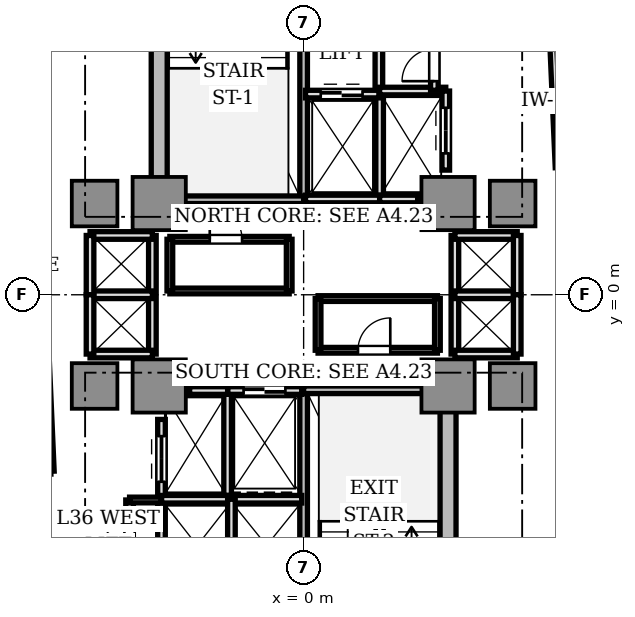
"""IFC4 building model, lengths in metres.
Left out: names, types, materials, properties, quantities, classifications, styles, units other than length and angle.
Written with IfcOpenShell. Run it as: python <this file> out.ifc"""

import sys

from ifc_helpers import new_model, si_unit, direction, frame, frame_2d, origin, origin_2d, place, context, subcontext, project, spatial, rectangle, extrude, source, transform, mapped, element, fill, save


model = new_model("IFC4")
c1 = context("Model", 3, precision=1e-05, world=origin(), true_north=direction((0.0, 1.0)))
c2 = subcontext(c1, "Body", "Model", "MODEL_VIEW")
j1 = project(units=[si_unit("LENGTHUNIT", "METRE"), si_unit("PLANEANGLEUNIT", "RADIAN")], contexts=[c1])
p1 = place(None, origin())
s1 = spatial("IfcSite", under=j1, at=p1, CompositionType="ELEMENT")
p2 = place(p1, origin())
s2 = spatial("IfcBuilding", under=s1, at=p2, CompositionType="ELEMENT")
p3 = place(p2, frame((0.0, 0.0, 131.55)))
s3 = spatial("IfcBuildingStorey", under=s2, at=p3, CompositionType="ELEMENT", Elevation=131.55)
for number, where, z_axis, x_axis in (
    (1, (-3.8, 2.85, 0.0), (0.0, 0.0, 1.0), (0.0, 1.0, 0.0)),
    (2, (3.8, -9.75, 0.0), (0.0, 0.0, 1.0), (0.0, 1.0, 0.0)),
):
    element("IfcWall", number, at=place(p3, frame(where, z_axis=z_axis, x_axis=x_axis)), inside=s3, PredefinedType="SHEAR", context=c2, shape_type="SweptSolid", body=[
        extrude(rectangle(XDim=6.9, YDim=0.42, at=frame_2d((3.45, 0.0))), origin(), (0.0, 0.0, 1.0), 3.11),
    ])
m1 = source(origin(), c2, "Body", "SweptSolid", [
    extrude(rectangle(XDim=1.4, YDim=1.4, at=origin_2d()), origin(), (0.0, 0.0, 1.0), 3.11),
])
for number, where, z_axis, x_axis in (
    (3, (-3.8, 2.4, 0.0), (0.0, 0.0, 1.0), (1.0, 0.0, 0.0)),
    (4, (3.8, 2.4, 0.0), (0.0, 0.0, 1.0), (1.0, 0.0, 0.0)),
    (5, (-3.8, -2.4, 0.0), (0.0, 0.0, 1.0), (1.0, 0.0, 0.0)),
    (6, (3.8, -2.4, 0.0), (0.0, 0.0, 1.0), (1.0, 0.0, 0.0)),
):
    element("IfcColumn", number, at=place(p3, frame(where, z_axis=z_axis, x_axis=x_axis)), inside=s3, PredefinedType="COLUMN", context=c2, shape_type="MappedRepresentation", body=[
        mapped(m1, transform((0.0, 0.0, 0.0), scale=1.0)),
    ])
m2 = source(origin(), c2, "Body", "SweptSolid", [
    extrude(rectangle(XDim=1.2, YDim=1.2, at=origin_2d()), origin(), (0.0, 0.0, 1.0), 3.11),
])
for number, where, z_axis, x_axis in (
    (7, (5.5, 2.4, 0.0), (0.0, 0.0, 1.0), (1.0, 0.0, 0.0)),
    (8, (-5.5, 2.4, 0.0), (0.0, 0.0, 1.0), (1.0, 0.0, 0.0)),
    (9, (5.5, -2.4, 0.0), (0.0, 0.0, 1.0), (1.0, 0.0, 0.0)),
    (10, (-5.5, -2.4, 0.0), (0.0, 0.0, 1.0), (1.0, 0.0, 0.0)),
):
    element("IfcColumn", number, at=place(p3, frame(where, z_axis=z_axis, x_axis=x_axis)), inside=s3, PredefinedType="COLUMN", context=c2, shape_type="MappedRepresentation", body=[
        mapped(m2, transform((0.0, 0.0, 0.0), scale=1.0)),
    ])
p4 = place(p3, frame((0.0, 2.5, 0.0), z_axis=(0.0, 0.0, 1.0), x_axis=(0.0, 1.0, 0.0)))
e11 = element("IfcWall", 11, at=p4, inside=s3, PredefinedType="SOLIDWALL", context=c2, shape_type="SweptSolid", body=[
    extrude(rectangle(XDim=7.68, YDim=0.2, at=frame_2d((3.84, 0.0))), origin(), (0.0, 0.0, 1.0), 3.11),
])
p5 = place(p4, frame((6.36, 0.0, 0.0)))
e12 = element("IfcOpeningElement", 12, at=p5, cuts=e11, PredefinedType="OPENING", context=c2, shape_type="SweptSolid", body=[
    extrude(rectangle(XDim=1.1, YDim=2.15, at=frame_2d((0.55, 1.075))), frame((0.0, 0.11, 0.0), z_axis=(0.0, -1.0, 0.0), x_axis=(1.0, 0.0, 0.0)), (0.0, 0.0, 1.0), 0.22),
])
p6 = place(p3, frame((-3.72, 2.5, 0.0), z_axis=(0.0, 0.0, 1.0), x_axis=(1.0, 0.0, 0.0)))
e13 = element("IfcWall", 13, at=p6, inside=s3, PredefinedType="SOLIDWALL", context=c2, shape_type="SweptSolid", body=[
    extrude(rectangle(XDim=3.72, YDim=0.2, at=frame_2d((1.86, 0.0))), origin(), (0.0, 0.0, 1.0), 3.11),
])
p7 = place(p3, frame((0.0, -10.18, 0.0), z_axis=(0.0, 0.0, 1.0), x_axis=(0.0, 1.0, 0.0)))
e14 = element("IfcWall", 14, at=p7, inside=s3, PredefinedType="SOLIDWALL", context=c2, shape_type="SweptSolid", body=[
    extrude(rectangle(XDim=7.68, YDim=0.2, at=frame_2d((3.84, 0.0))), origin(), (0.0, 0.0, 1.0), 3.11),
])
p8 = place(p7, frame((0.28, 0.0, 0.0)))
e15 = element("IfcOpeningElement", 15, at=p8, cuts=e14, PredefinedType="OPENING", context=c2, shape_type="SweptSolid", body=[
    extrude(rectangle(XDim=1.1, YDim=2.15, at=frame_2d((0.55, 1.075))), frame((0.0, 0.11, 0.0), z_axis=(0.0, -1.0, 0.0), x_axis=(1.0, 0.0, 0.0)), (0.0, 0.0, 1.0), 0.22),
])
p9 = place(p3, frame((0.0, -2.5, 0.0), z_axis=(0.0, 0.0, 1.0), x_axis=(1.0, 0.0, 0.0)))
e16 = element("IfcWall", 16, at=p9, inside=s3, PredefinedType="SOLIDWALL", context=c2, shape_type="SweptSolid", body=[
    extrude(rectangle(XDim=3.72, YDim=0.2, at=frame_2d((1.86, 0.0))), origin(), (0.0, 0.0, 1.0), 3.11),
])
p10 = place(p3, frame((1.98, 5.32, 0.0), z_axis=(0.0, 0.0, 1.0), x_axis=(0.0, 1.0, 0.0)))
e17 = element("IfcWall", 17, at=p10, inside=s3, PredefinedType="SOLIDWALL", context=c2, shape_type="SweptSolid", body=[
    extrude(rectangle(XDim=4.66, YDim=0.2, at=frame_2d((2.33, 0.0))), origin(), (0.0, 0.0, 1.0), 2.66),
])
p11 = place(p10, frame((3.04, 0.0, 0.0)))
e18 = element("IfcOpeningElement", 18, at=p11, cuts=e17, PredefinedType="OPENING", context=c2, shape_type="SweptSolid", body=[
    extrude(rectangle(XDim=0.85, YDim=2.1, at=frame_2d((0.425, 1.05))), frame((0.0, 0.11, 0.0), z_axis=(0.0, -1.0, 0.0), x_axis=(1.0, 0.0, 0.0)), (0.0, 0.0, 1.0), 0.22),
])
p12 = place(p3, frame((2.0, 2.5, 0.0), z_axis=(0.0, 0.0, 1.0), x_axis=(0.0, 1.0, 0.0)))
e19 = element("IfcWall", 19, at=p12, inside=s3, PredefinedType="SOLIDWALL", context=c2, shape_type="SweptSolid", body=[
    extrude(rectangle(XDim=2.78, YDim=0.2, at=frame_2d((1.39, 0.0))), origin(), (0.0, 0.0, 1.0), 2.66),
])
p13 = place(p3, frame((0.05, 2.52, 0.0), z_axis=(0.0, 0.0, 1.0), x_axis=(1.0, 0.0, 0.0)))
e20 = element("IfcWall", 20, at=p13, inside=s3, PredefinedType="SOLIDWALL", context=c2, shape_type="SweptSolid", body=[
    extrude(rectangle(XDim=1.95, YDim=0.2, at=frame_2d((0.975, 0.0))), origin(), (0.0, 0.0, 1.0), 2.66),
])
p14 = place(p3, frame((0.05, 5.28, 0.0), z_axis=(0.0, 0.0, 1.0), x_axis=(1.0, 0.0, 0.0)))
e21 = element("IfcWall", 21, at=p14, inside=s3, PredefinedType="SOLIDWALL", context=c2, shape_type="SweptSolid", body=[
    extrude(rectangle(XDim=1.93, YDim=0.2, at=frame_2d((0.965, 0.0))), origin(), (0.0, 0.0, 1.0), 2.66),
])
p15 = place(p14, frame((0.4, 0.0, 0.0)))
e22 = element("IfcOpeningElement", 22, at=p15, cuts=e21, PredefinedType="OPENING", context=c2, shape_type="SweptSolid", body=[
    extrude(rectangle(XDim=1.1, YDim=2.2, at=frame_2d((0.55, 1.1))), frame((0.0, 0.11, 0.0), z_axis=(0.0, -1.0, 0.0), x_axis=(1.0, 0.0, 0.0)), (0.0, 0.0, 1.0), 0.22),
])
p16 = place(p3, frame((-2.0, -5.28, 0.0), z_axis=(0.0, 0.0, 1.0), x_axis=(0.0, 1.0, 0.0)))
e23 = element("IfcWall", 23, at=p16, inside=s3, PredefinedType="SOLIDWALL", context=c2, shape_type="SweptSolid", body=[
    extrude(rectangle(XDim=2.78, YDim=0.2, at=frame_2d((1.39, 0.0))), origin(), (0.0, 0.0, 1.0), 2.66),
])
p17 = place(p3, frame((-2.0, -2.52, 0.0), z_axis=(0.0, 0.0, 1.0), x_axis=(1.0, 0.0, 0.0)))
e24 = element("IfcWall", 24, at=p17, inside=s3, PredefinedType="SOLIDWALL", context=c2, shape_type="SweptSolid", body=[
    extrude(rectangle(XDim=1.95, YDim=0.2, at=frame_2d((0.975, 0.0))), origin(), (0.0, 0.0, 1.0), 2.66),
])
p18 = place(p17, frame((0.42, 0.0, 0.0)))
e25 = element("IfcOpeningElement", 25, at=p18, cuts=e24, PredefinedType="OPENING", context=c2, shape_type="SweptSolid", body=[
    extrude(rectangle(XDim=1.1, YDim=2.2, at=frame_2d((0.55, 1.1))), frame((0.0, 0.11, 0.0), z_axis=(0.0, -1.0, 0.0), x_axis=(1.0, 0.0, 0.0)), (0.0, 0.0, 1.0), 0.22),
])
p19 = place(p3, frame((2.0, 2.52, 0.0), z_axis=(0.0, 0.0, 1.0), x_axis=(1.0, 0.0, 0.0)))
e26 = element("IfcWall", 26, at=p19, inside=s3, PredefinedType="SOLIDWALL", context=c2, shape_type="SweptSolid", body=[
    extrude(rectangle(XDim=1.0, YDim=0.2, at=frame_2d((0.5, 0.0))), origin(), (0.0, 0.0, 1.0), 2.66),
])
p20 = place(p3, frame((2.0, 5.36, 0.0), z_axis=(0.0, 0.0, 1.0), x_axis=(1.0, 0.0, 0.0)))
e27 = element("IfcWall", 27, at=p20, inside=s3, PredefinedType="SOLIDWALL", context=c2, shape_type="SweptSolid", body=[
    extrude(rectangle(XDim=1.74, YDim=0.2, at=frame_2d((0.87, 0.0))), origin(), (0.0, 0.0, 1.0), 2.66),
])
p21 = place(p3, frame((3.74, 3.28, 0.0), z_axis=(0.0, 0.0, 1.0), x_axis=(0.0, 1.0, 0.0)))
e28 = element("IfcWall", 28, at=p21, inside=s3, PredefinedType="SOLIDWALL", context=c2, shape_type="SweptSolid", body=[
    extrude(rectangle(XDim=2.08, YDim=0.2, at=frame_2d((1.04, 0.0))), origin(), (0.0, 0.0, 1.0), 2.66),
])
p22 = place(p21, frame((0.44, 0.0, 0.0)))
e29 = element("IfcOpeningElement", 29, at=p22, cuts=e28, PredefinedType="OPENING", context=c2, shape_type="SweptSolid", body=[
    extrude(rectangle(XDim=1.2, YDim=2.2, at=frame_2d((0.6, 1.1))), frame((0.0, 0.11, 0.0), z_axis=(0.0, -1.0, 0.0), x_axis=(1.0, 0.0, 0.0)), (0.0, 0.0, 1.0), 0.22),
])
p23 = place(p3, frame((-3.0, -2.52, 0.0), z_axis=(0.0, 0.0, 1.0), x_axis=(1.0, 0.0, 0.0)))
e30 = element("IfcWall", 30, at=p23, inside=s3, PredefinedType="SOLIDWALL", context=c2, shape_type="SweptSolid", body=[
    extrude(rectangle(XDim=1.0, YDim=0.2, at=frame_2d((0.5, 0.0))), origin(), (0.0, 0.0, 1.0), 2.66),
])
p24 = place(p3, frame((-3.74, -5.36, 0.0), z_axis=(0.0, 0.0, 1.0), x_axis=(0.0, 1.0, 0.0)))
e31 = element("IfcWall", 31, at=p24, inside=s3, PredefinedType="SOLIDWALL", context=c2, shape_type="SweptSolid", body=[
    extrude(rectangle(XDim=2.08, YDim=0.2, at=frame_2d((1.04, 0.0))), origin(), (0.0, 0.0, 1.0), 2.66),
])
p25 = place(p24, frame((0.44, 0.0, 0.0)))
e32 = element("IfcOpeningElement", 32, at=p25, cuts=e31, PredefinedType="OPENING", context=c2, shape_type="SweptSolid", body=[
    extrude(rectangle(XDim=1.2, YDim=2.2, at=frame_2d((0.6, 1.1))), frame((0.0, 0.11, 0.0), z_axis=(0.0, -1.0, 0.0), x_axis=(1.0, 0.0, 0.0)), (0.0, 0.0, 1.0), 0.22),
])
p26 = place(p3, frame((-3.74, -7.86, 0.0), z_axis=(0.0, 0.0, 1.0), x_axis=(0.0, 1.0, 0.0)))
e33 = element("IfcWall", 33, at=p26, inside=s3, PredefinedType="SOLIDWALL", context=c2, shape_type="SweptSolid", body=[
    extrude(rectangle(XDim=2.48, YDim=0.2, at=frame_2d((1.24, 0.0))), origin(), (0.0, 0.0, 1.0), 2.66),
])
p27 = place(p3, frame((-3.74, -5.38, 0.0), z_axis=(0.0, 0.0, 1.0), x_axis=(1.0, 0.0, 0.0)))
e34 = element("IfcWall", 34, at=p27, inside=s3, PredefinedType="SOLIDWALL", context=c2, shape_type="SweptSolid", body=[
    extrude(rectangle(XDim=3.69, YDim=0.2, at=frame_2d((1.845, 0.0))), origin(), (0.0, 0.0, 1.0), 2.66),
])
p28 = place(p3, frame((-1.9, -7.86, 0.0), z_axis=(0.0, 0.0, 1.0), x_axis=(0.0, 1.0, 0.0)))
e35 = element("IfcWall", 35, at=p28, inside=s3, PredefinedType="SOLIDWALL", context=c2, shape_type="SweptSolid", body=[
    extrude(rectangle(XDim=2.48, YDim=0.2, at=frame_2d((1.24, 0.0))), origin(), (0.0, 0.0, 1.0), 2.66),
])
p29 = place(p3, frame((3.98, -1.56, 0.0), z_axis=(0.0, 0.0, 1.0), x_axis=(0.0, 1.0, 0.0)))
e36 = element("IfcWall", 36, at=p29, inside=s3, PredefinedType="SOLIDWALL", context=c2, shape_type="SweptSolid", body=[
    extrude(rectangle(XDim=3.12, YDim=0.2, at=frame_2d((1.56, 0.0))), origin(), (0.0, 0.0, 1.0), 2.28),
])
for number, where, z_axis, x_axis in (
    (37, (3.98, 1.56, 0.0), (0.0, 0.0, 1.0), (1.0, 0.0, 0.0)),
    (38, (3.98, -1.56, 0.0), (0.0, 0.0, 1.0), (1.0, 0.0, 0.0)),
    (39, (3.98, 0.0, 0.0), (0.0, 0.0, 1.0), (1.0, 0.0, 0.0)),
):
    element("IfcWall", number, at=place(p3, frame(where, z_axis=z_axis, x_axis=x_axis)), inside=s3, PredefinedType="SOLIDWALL", context=c2, shape_type="SweptSolid", body=[
        extrude(rectangle(XDim=1.64, YDim=0.2, at=frame_2d((0.82, 0.0))), origin(), (0.0, 0.0, 1.0), 2.66),
    ])
for number, where, z_axis, x_axis in (
    (40, (5.62, 0.0, 0.0), (0.0, 0.0, 1.0), (0.0, 1.0, 0.0)),
    (41, (5.62, -1.56, 0.0), (0.0, 0.0, 1.0), (0.0, 1.0, 0.0)),
):
    element("IfcWall", number, at=place(p3, frame(where, z_axis=z_axis, x_axis=x_axis)), inside=s3, PredefinedType="SOLIDWALL", context=c2, shape_type="SweptSolid", body=[
        extrude(rectangle(XDim=1.56, YDim=0.2, at=frame_2d((0.78, 0.0))), origin(), (0.0, 0.0, 1.0), 2.66),
    ])
p30 = place(p3, frame((-3.98, -1.56, 0.0), z_axis=(0.0, 0.0, 1.0), x_axis=(0.0, 1.0, 0.0)))
e42 = element("IfcWall", 42, at=p30, inside=s3, PredefinedType="SOLIDWALL", context=c2, shape_type="SweptSolid", body=[
    extrude(rectangle(XDim=3.12, YDim=0.2, at=frame_2d((1.56, 0.0))), origin(), (0.0, 0.0, 1.0), 2.28),
])
for number, where, z_axis, x_axis in (
    (43, (-5.62, 1.56, 0.0), (0.0, 0.0, 1.0), (1.0, 0.0, 0.0)),
    (44, (-5.62, -1.56, 0.0), (0.0, 0.0, 1.0), (1.0, 0.0, 0.0)),
    (45, (-5.62, 0.0, 0.0), (0.0, 0.0, 1.0), (1.0, 0.0, 0.0)),
):
    element("IfcWall", number, at=place(p3, frame(where, z_axis=z_axis, x_axis=x_axis)), inside=s3, PredefinedType="SOLIDWALL", context=c2, shape_type="SweptSolid", body=[
        extrude(rectangle(XDim=1.64, YDim=0.2, at=frame_2d((0.82, 0.0))), origin(), (0.0, 0.0, 1.0), 2.66),
    ])
for number, where, z_axis, x_axis in (
    (46, (-5.62, 0.0, 0.0), (0.0, 0.0, 1.0), (0.0, 1.0, 0.0)),
    (47, (-5.62, -1.56, 0.0), (0.0, 0.0, 1.0), (0.0, 1.0, 0.0)),
):
    element("IfcWall", number, at=place(p3, frame(where, z_axis=z_axis, x_axis=x_axis)), inside=s3, PredefinedType="SOLIDWALL", context=c2, shape_type="SweptSolid", body=[
        extrude(rectangle(XDim=1.56, YDim=0.2, at=frame_2d((0.78, 0.0))), origin(), (0.0, 0.0, 1.0), 2.66),
    ])
p31 = place(p3, frame((3.44, 5.38, 0.0), z_axis=(0.0, 0.0, 1.0), x_axis=(0.0, 1.0, 0.0)))
e48 = element("IfcWall", 48, at=p31, inside=s3, PredefinedType="SOLIDWALL", context=c2, shape_type="SweptSolid", body=[
    extrude(rectangle(XDim=2.77, YDim=0.2, at=frame_2d((1.385, 0.0))), origin(), (0.0, 0.0, 1.0), 2.66),
])
p32 = place(p31, frame((0.24, 0.0, 0.0)))
e49 = element("IfcOpeningElement", 49, at=p32, cuts=e48, PredefinedType="OPENING", context=c2, shape_type="SweptSolid", body=[
    extrude(rectangle(XDim=0.85, YDim=2.1, at=frame_2d((0.425, 1.05))), frame((0.0, 0.11, 0.0), z_axis=(0.0, -1.0, 0.0), x_axis=(1.0, 0.0, 0.0)), (0.0, 0.0, 1.0), 0.22),
])
p33 = place(p31, frame((1.62, 0.0, 0.0)))
e50 = element("IfcOpeningElement", 50, at=p33, cuts=e48, PredefinedType="OPENING", context=c2, shape_type="SweptSolid", body=[
    extrude(rectangle(XDim=0.85, YDim=2.1, at=frame_2d((0.425, 1.05))), frame((0.0, 0.11, 0.0), z_axis=(0.0, -1.0, 0.0), x_axis=(1.0, 0.0, 0.0)), (0.0, 0.0, 1.0), 0.22),
])
p34 = place(p3, frame((-4.58, -7.86, 0.0), z_axis=(0.0, 0.0, 1.0), x_axis=(0.0, 1.0, 0.0)))
e51 = element("IfcWall", 51, at=p34, inside=s3, PredefinedType="SOLIDWALL", context=c2, shape_type="SweptSolid", body=[
    extrude(rectangle(XDim=2.46, YDim=0.2, at=frame_2d((1.23, 0.0))), origin(), (0.0, 0.0, 1.0), 2.66),
])
p35 = place(p34, frame((0.2, 0.0, 0.0)))
e52 = element("IfcOpeningElement", 52, at=p35, cuts=e51, PredefinedType="OPENING", context=c2, shape_type="SweptSolid", body=[
    extrude(rectangle(XDim=0.85, YDim=2.1, at=frame_2d((0.425, 1.05))), frame((0.0, 0.11, 0.0), z_axis=(0.0, -1.0, 0.0), x_axis=(1.0, 0.0, 0.0)), (0.0, 0.0, 1.0), 0.22),
])
p36 = place(p34, frame((1.38, 0.0, 0.0)))
e53 = element("IfcOpeningElement", 53, at=p36, cuts=e51, PredefinedType="OPENING", context=c2, shape_type="SweptSolid", body=[
    extrude(rectangle(XDim=0.85, YDim=2.1, at=frame_2d((0.425, 1.05))), frame((0.0, 0.11, 0.0), z_axis=(0.0, -1.0, 0.0), x_axis=(1.0, 0.0, 0.0)), (0.0, 0.0, 1.0), 0.22),
])
p37 = place(p3, frame((-4.58, -5.4, 0.0), z_axis=(0.0, 0.0, 1.0), x_axis=(1.0, 0.0, 0.0)))
e54 = element("IfcWall", 54, at=p37, inside=s3, PredefinedType="PARTITIONING", context=c2, shape_type="SweptSolid", body=[
    extrude(rectangle(XDim=0.84, YDim=0.15, at=frame_2d((0.42, 0.0))), origin(), (0.0, 0.0, 1.0), 2.66),
])
p38 = place(p3, frame((-3.52, 0.1, 0.0), z_axis=(0.0, 0.0, 1.0), x_axis=(1.0, 0.0, 0.0)))
e55 = element("IfcWall", 55, at=p38, inside=s3, PredefinedType="PARTITIONING", context=c2, shape_type="SweptSolid", body=[
    extrude(rectangle(XDim=3.14, YDim=0.15, at=frame_2d((1.57, 0.0))), origin(), (0.0, 0.0, 1.0), 2.66),
])
p39 = place(p3, frame((-3.52, 1.46, 0.0), z_axis=(0.0, 0.0, 1.0), x_axis=(1.0, 0.0, 0.0)))
e56 = element("IfcWall", 56, at=p39, inside=s3, PredefinedType="PARTITIONING", context=c2, shape_type="SweptSolid", body=[
    extrude(rectangle(XDim=3.14, YDim=0.15, at=frame_2d((1.57, 0.0))), origin(), (0.0, 0.0, 1.0), 2.66),
])
p40 = place(p39, frame((1.05, 0.0, 0.0)))
e57 = element("IfcOpeningElement", 57, at=p40, cuts=e56, PredefinedType="OPENING", context=c2, shape_type="SweptSolid", body=[
    extrude(rectangle(XDim=0.85, YDim=2.1, at=frame_2d((0.425, 1.05))), frame((0.0, 0.085, 0.0), z_axis=(0.0, -1.0, 0.0), x_axis=(1.0, 0.0, 0.0)), (0.0, 0.0, 1.0), 0.17),
])
p41 = place(p3, frame((-3.52, 0.1, 0.0), z_axis=(0.0, 0.0, 1.0), x_axis=(0.0, 1.0, 0.0)))
e58 = element("IfcWall", 58, at=p41, inside=s3, PredefinedType="PARTITIONING", context=c2, shape_type="SweptSolid", body=[
    extrude(rectangle(XDim=1.36, YDim=0.15, at=frame_2d((0.68, 0.0))), origin(), (0.0, 0.0, 1.0), 2.28),
])
p42 = place(p3, frame((-0.38, 0.1, 0.0), z_axis=(0.0, 0.0, 1.0), x_axis=(0.0, 1.0, 0.0)))
e59 = element("IfcWall", 59, at=p42, inside=s3, PredefinedType="PARTITIONING", context=c2, shape_type="SweptSolid", body=[
    extrude(rectangle(XDim=1.36, YDim=0.15, at=frame_2d((0.68, 0.0))), origin(), (0.0, 0.0, 1.0), 2.66),
])
p43 = place(p3, frame((0.38, -0.1, 0.0), z_axis=(0.0, 0.0, 1.0), x_axis=(1.0, 0.0, 0.0)))
e60 = element("IfcWall", 60, at=p43, inside=s3, PredefinedType="PARTITIONING", context=c2, shape_type="SweptSolid", body=[
    extrude(rectangle(XDim=3.14, YDim=0.15, at=frame_2d((1.57, 0.0))), origin(), (0.0, 0.0, 1.0), 2.66),
])
p44 = place(p3, frame((0.38, -1.46, 0.0), z_axis=(0.0, 0.0, 1.0), x_axis=(1.0, 0.0, 0.0)))
e61 = element("IfcWall", 61, at=p44, inside=s3, PredefinedType="PARTITIONING", context=c2, shape_type="SweptSolid", body=[
    extrude(rectangle(XDim=3.14, YDim=0.15, at=frame_2d((1.57, 0.0))), origin(), (0.0, 0.0, 1.0), 2.66),
])
p45 = place(p44, frame((1.05, 0.0, 0.0)))
e62 = element("IfcOpeningElement", 62, at=p45, cuts=e61, PredefinedType="OPENING", context=c2, shape_type="SweptSolid", body=[
    extrude(rectangle(XDim=0.85, YDim=2.1, at=frame_2d((0.425, 1.05))), frame((0.0, 0.085, 0.0), z_axis=(0.0, -1.0, 0.0), x_axis=(1.0, 0.0, 0.0)), (0.0, 0.0, 1.0), 0.17),
])
p46 = place(p3, frame((0.38, -1.46, 0.0), z_axis=(0.0, 0.0, 1.0), x_axis=(0.0, 1.0, 0.0)))
e63 = element("IfcWall", 63, at=p46, inside=s3, PredefinedType="PARTITIONING", context=c2, shape_type="SweptSolid", body=[
    extrude(rectangle(XDim=1.36, YDim=0.15, at=frame_2d((0.68, 0.0))), origin(), (0.0, 0.0, 1.0), 2.66),
])
p47 = place(p3, frame((3.52, -1.46, 0.0), z_axis=(0.0, 0.0, 1.0), x_axis=(0.0, 1.0, 0.0)))
e64 = element("IfcWall", 64, at=p47, inside=s3, PredefinedType="PARTITIONING", context=c2, shape_type="SweptSolid", body=[
    extrude(rectangle(XDim=1.36, YDim=0.15, at=frame_2d((0.68, 0.0))), origin(), (0.0, 0.0, 1.0), 2.28),
])
p48 = place(p3, frame((6.71, 3.346, 0.0), z_axis=(0.0, 0.0, 1.0), x_axis=(-0.043597663116, 0.999049169846, 0.0)))
e65 = element("IfcWall", 65, at=p48, inside=s3, PredefinedType="PARTITIONING", context=c2, shape_type="SweptSolid", body=[
    extrude(rectangle(XDim=3.5, YDim=0.18, at=frame_2d((1.75, 0.0))), origin(), (0.0, 0.0, 1.0), 2.66),
])
p49 = place(p3, frame((-7.129, 6.245, 0.0), z_axis=(0.0, 0.0, 1.0), x_axis=(0.043608291235, -0.999048705988, 0.0)))
e66 = element("IfcWall", 66, at=p49, inside=s3, PredefinedType="PARTITIONING", context=c2, shape_type="SweptSolid", body=[
    extrude(rectangle(XDim=10.9, YDim=0.18, at=frame_2d((5.45, 0.0))), origin(), (0.0, 0.0, 1.0), 2.66),
])
m3 = source(origin(), c2, "Body", "SweptSolid", [
    extrude(rectangle(XDim=1.1, YDim=0.05, at=origin_2d()), origin(), (0.0, 0.0, 1.0), 2.2),
])
p50 = place(p15, frame((0.55, 0.0, 0.0)))
e67 = element("IfcDoor", 67, at=p50, inside=s3, OperationType="DOUBLE_DOOR_SLIDING", PredefinedType="DOOR", context=c2, shape_type="MappedRepresentation", body=[
    mapped(m3, transform((0.0, 0.0, 0.0), scale=1.0)),
])
fill(e22, e67)
p51 = place(p18, frame((0.55, 0.0, 0.0)))
e68 = element("IfcDoor", 68, at=p51, inside=s3, OperationType="DOUBLE_DOOR_SLIDING", PredefinedType="DOOR", context=c2, shape_type="MappedRepresentation", body=[
    mapped(m3, transform((0.0, 0.0, 0.0), scale=1.0)),
])
fill(e25, e68)
m4 = source(origin(), c2, "Body", "SweptSolid", [
    extrude(rectangle(XDim=1.2, YDim=0.05, at=origin_2d()), origin(), (0.0, 0.0, 1.0), 2.2),
])
p52 = place(p22, frame((0.6, 0.0, 0.0)))
e69 = element("IfcDoor", 69, at=p52, inside=s3, OperationType="DOUBLE_DOOR_SLIDING", PredefinedType="DOOR", context=c2, shape_type="MappedRepresentation", body=[
    mapped(m4, transform((0.0, 0.0, 0.0), scale=1.0)),
])
fill(e29, e69)
p53 = place(p25, frame((0.6, 0.0, 0.0)))
e70 = element("IfcDoor", 70, at=p53, inside=s3, OperationType="DOUBLE_DOOR_SLIDING", PredefinedType="DOOR", context=c2, shape_type="MappedRepresentation", body=[
    mapped(m4, transform((0.0, 0.0, 0.0), scale=1.0)),
])
fill(e32, e70)
m5 = source(origin(), c2, "Body", "SweptSolid", [
    extrude(rectangle(XDim=0.85, YDim=0.05, at=origin_2d()), origin(), (0.0, 0.0, 1.0), 2.1),
])
p54 = place(p32, frame((0.425, 0.0, 0.0)))
e71 = element("IfcDoor", 71, at=p54, inside=s3, OperationType="SINGLE_SWING_LEFT", PredefinedType="DOOR", context=c2, shape_type="MappedRepresentation", body=[
    mapped(m5, transform((0.0, 0.0, 0.0), scale=1.0)),
])
fill(e49, e71)
p55 = place(p36, frame((0.425, 0.0, 0.0)))
e72 = element("IfcDoor", 72, at=p55, inside=s3, OperationType="SINGLE_SWING_RIGHT", PredefinedType="DOOR", context=c2, shape_type="MappedRepresentation", body=[
    mapped(m5, transform((0.0, 0.0, 0.0), scale=1.0)),
])
fill(e53, e72)
p56 = place(p40, frame((0.425, 0.0, 0.0)))
e73 = element("IfcDoor", 73, at=p56, inside=s3, OperationType="SINGLE_SWING_LEFT", PredefinedType="DOOR", context=c2, shape_type="MappedRepresentation", body=[
    mapped(m5, transform((0.0, 0.0, 0.0), scale=1.0)),
])
fill(e57, e73)
p57 = place(p45, frame((0.425, 0.0, 0.0)))
e74 = element("IfcDoor", 74, at=p57, inside=s3, OperationType="SINGLE_SWING_RIGHT", PredefinedType="DOOR", context=c2, shape_type="MappedRepresentation", body=[
    mapped(m5, transform((0.0, 0.0, 0.0), scale=1.0)),
])
fill(e62, e74)
save(model, sys.argv[1])
